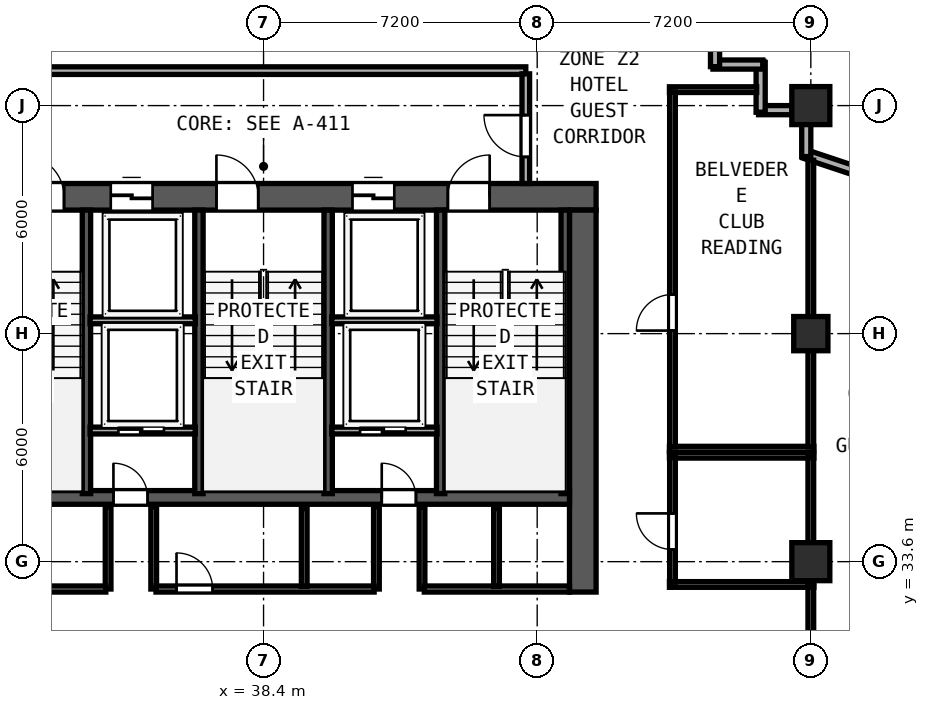
"""IFC4 building model, lengths in metres.
Left out: names, types, materials, properties, quantities, classifications, styles, units other than length and angle.
Written with IfcOpenShell. Run it as: python <this file> out.ifc"""

import sys

from ifc_helpers import new_model, si_unit, direction, frame, frame_2d, origin, origin_2d, place, context, subcontext, project, spatial, rectangle, hollow_rectangle, extrude, element, fill, save


model = new_model("IFC4")
c1 = context("Model", 3, precision=1e-05, world=origin(), true_north=direction((0.0, 1.0)))
c2 = subcontext(c1, "Body", "Model", "MODEL_VIEW")
j1 = project(units=[si_unit("LENGTHUNIT", "METRE"), si_unit("PLANEANGLEUNIT", "RADIAN")], contexts=[c1])
p1 = place(None, origin())
s1 = spatial("IfcSite", under=j1, at=p1, CompositionType="ELEMENT")
p2 = place(p1, origin())
s2 = spatial("IfcBuilding", under=s1, at=p2, CompositionType="ELEMENT")
p3 = place(p2, frame((0.0, 0.0, 128.8)))
s3 = spatial("IfcBuildingStorey", under=s2, at=p3, CompositionType="ELEMENT", Elevation=128.8)
p4 = place(p3, frame((29.65, 43.2, 0.0), z_axis=(0.0, 0.0, 1.0), x_axis=(1.0, 0.0, 0.0)))
e1 = element("IfcWall", 1, at=p4, inside=s3, PredefinedType="SHEAR", context=c2, shape_type="SweptSolid", body=[
    extrude(rectangle(XDim=17.5, YDim=0.7, at=frame_2d((8.75, 0.0))), origin(), (0.0, 0.0, 1.0), 3.6),
])
p5 = place(p4, frame((2.4, 0.0, 0.0)))
e2 = element("IfcOpeningElement", 2, at=p5, cuts=e1, PredefinedType="OPENING", context=c2, shape_type="SweptSolid", body=[
    extrude(rectangle(XDim=1.1, YDim=2.15, at=frame_2d((0.55, 1.075))), frame((0.0, 0.36, 0.0), z_axis=(0.0, -1.0, 0.0), x_axis=(1.0, 0.0, 0.0)), (0.0, 0.0, 1.0), 0.72),
])
p6 = place(p4, frame((7.51, 0.0, 0.0)))
e3 = element("IfcOpeningElement", 3, at=p6, cuts=e1, PredefinedType="OPENING", context=c2, shape_type="SweptSolid", body=[
    extrude(rectangle(XDim=1.1, YDim=2.15, at=frame_2d((0.55, 1.075))), frame((0.0, 0.36, 0.0), z_axis=(0.0, -1.0, 0.0), x_axis=(1.0, 0.0, 0.0)), (0.0, 0.0, 1.0), 0.72),
])
p7 = place(p4, frame((13.6, 0.0, 0.0)))
e4 = element("IfcOpeningElement", 4, at=p7, cuts=e1, PredefinedType="OPENING", context=c2, shape_type="SweptSolid", body=[
    extrude(rectangle(XDim=1.1, YDim=2.15, at=frame_2d((0.55, 1.075))), frame((0.0, 0.36, 0.0), z_axis=(0.0, -1.0, 0.0), x_axis=(1.0, 0.0, 0.0)), (0.0, 0.0, 1.0), 0.72),
])
p8 = place(p4, frame((4.73, 0.0, 0.0)))
e5 = element("IfcOpeningElement", 5, at=p8, cuts=e1, PredefinedType="OPENING", context=c2, shape_type="SweptSolid", body=[
    extrude(rectangle(XDim=1.1, YDim=2.2, at=frame_2d((0.55, 1.1))), frame((0.0, 0.36, 0.0), z_axis=(0.0, -1.0, 0.0), x_axis=(1.0, 0.0, 0.0)), (0.0, 0.0, 1.0), 0.72),
])
p9 = place(p4, frame((11.09, 0.0, 0.0)))
e6 = element("IfcOpeningElement", 6, at=p9, cuts=e1, PredefinedType="OPENING", context=c2, shape_type="SweptSolid", body=[
    extrude(rectangle(XDim=1.1, YDim=2.2, at=frame_2d((0.55, 1.1))), frame((0.0, 0.36, 0.0), z_axis=(0.0, -1.0, 0.0), x_axis=(1.0, 0.0, 0.0)), (0.0, 0.0, 1.0), 0.72),
])
p10 = place(p3, frame((46.8, 32.8, 0.0), z_axis=(0.0, 0.0, 1.0), x_axis=(0.0, 1.0, 0.0)))
e7 = element("IfcWall", 7, at=p10, inside=s3, PredefinedType="SHEAR", context=c2, shape_type="SweptSolid", body=[
    extrude(rectangle(XDim=10.05, YDim=0.7, at=frame_2d((5.025, 0.0))), origin(), (0.0, 0.0, 1.0), 3.6),
])
p11 = place(p3, frame((30.35, 35.29, 0.0), z_axis=(0.0, 0.0, 1.0), x_axis=(1.0, 0.0, 0.0)))
e8 = element("IfcWall", 8, at=p11, inside=s3, PredefinedType="SHEAR", context=c2, shape_type="SweptSolid", body=[
    extrude(rectangle(XDim=16.1, YDim=0.36, at=frame_2d((8.05, 0.0))), origin(), (0.0, 0.0, 1.0), 3.6),
])
p12 = place(p11, frame((5.0, 0.0, 0.0), z_axis=(0.0, 0.0, 1.0), x_axis=(-1.0, 0.0, 0.0)))
e9 = element("IfcOpeningElement", 9, at=p12, cuts=e8, PredefinedType="OPENING", context=c2, shape_type="SweptSolid", body=[
    extrude(rectangle(XDim=0.9, YDim=2.1, at=frame_2d((0.45, 1.05))), frame((0.0, 0.19, 0.0), z_axis=(0.0, -1.0, 0.0), x_axis=(1.0, 0.0, 0.0)), (0.0, 0.0, 1.0), 0.38),
])
p13 = place(p11, frame((12.06, 0.0, 0.0), z_axis=(0.0, 0.0, 1.0), x_axis=(-1.0, 0.0, 0.0)))
e10 = element("IfcOpeningElement", 10, at=p13, cuts=e8, PredefinedType="OPENING", context=c2, shape_type="SweptSolid", body=[
    extrude(rectangle(XDim=0.9, YDim=2.1, at=frame_2d((0.45, 1.05))), frame((0.0, 0.19, 0.0), z_axis=(0.0, -1.0, 0.0), x_axis=(1.0, 0.0, 0.0)), (0.0, 0.0, 1.0), 0.38),
])
for number, where, z_axis, x_axis in (
    (11, (33.74, 35.39, 0.0), (0.0, 0.0, 1.0), (0.0, 1.0, 0.0)),
    (12, (36.7, 35.39, 0.0), (0.0, 0.0, 1.0), (0.0, 1.0, 0.0)),
    (13, (40.1, 35.39, 0.0), (0.0, 0.0, 1.0), (0.0, 1.0, 0.0)),
    (14, (43.06, 35.39, 0.0), (0.0, 0.0, 1.0), (0.0, 1.0, 0.0)),
    (15, (46.338, 35.39, 0.0), (0.0, 0.0, 1.0), (0.0, 1.0, 0.0)),
):
    element("IfcWall", number, at=place(p3, frame(where, z_axis=z_axis, x_axis=x_axis)), inside=s3, PredefinedType="SHEAR", context=c2, shape_type="SweptSolid", body=[
        extrude(rectangle(XDim=7.46, YDim=0.22, at=frame_2d((3.73, 0.0))), origin(), (0.0, 0.0, 1.0), 3.6),
    ])
for number, where, z_axis, x_axis in (
    (16, (52.8, 33.6, 0.0), (0.0, 0.0, 1.0), (1.0, 0.0, 0.0)),
    (17, (52.8, 45.6, 0.0), (0.0, 0.0, 1.0), (1.0, 0.0, 0.0)),
):
    element("IfcColumn", number, at=place(p3, frame(where, z_axis=z_axis, x_axis=x_axis)), inside=s3, PredefinedType="COLUMN", context=c2, shape_type="SweptSolid", body=[
        extrude(hollow_rectangle(XDim=1.0, YDim=1.0, WallThickness=0.038, at=origin_2d()), origin(), (0.0, 0.0, 1.0), 3.8),
    ])
p14 = place(p3, frame((52.8, 39.6, 0.0), z_axis=(0.0, 0.0, 1.0), x_axis=(1.0, 0.0, 0.0)))
e18 = element("IfcColumn", 18, at=p14, inside=s3, PredefinedType="COLUMN", context=c2, shape_type="SweptSolid", body=[
    extrude(hollow_rectangle(XDim=0.9, YDim=0.9, WallThickness=0.034, at=origin_2d()), origin(), (0.0, 0.0, 1.0), 3.8),
])
p15 = place(p3, frame((58.295, 42.442, 0.0), z_axis=(0.0, 0.0, 1.0), x_axis=(-0.948687385027, 0.316215504823, 0.0)))
e19 = element("IfcWall", 19, at=p15, inside=s3, PredefinedType="SOLIDWALL", context=c2, shape_type="SweptSolid", body=[
    extrude(rectangle(XDim=5.973, YDim=0.24, at=frame_2d((2.987, 0.0))), origin(), (0.0, 0.0, 1.0), 3.145),
])
p16 = place(p15, frame((1.406, 0.0, 0.85)))
e20 = element("IfcOpeningElement", 20, at=p16, cuts=e19, PredefinedType="OPENING", context=c2, shape_type="SweptSolid", body=[
    extrude(rectangle(XDim=1.15, YDim=1.8, at=frame_2d((0.575, 0.9))), frame((0.0, 0.13, 0.0), z_axis=(0.0, -1.0, 0.0), x_axis=(1.0, 0.0, 0.0)), (0.0, 0.0, 1.0), 0.26),
])
p17 = place(p3, frame((52.68, 44.259, 0.0), z_axis=(0.0, 0.0, 1.0), x_axis=(0.0, 1.0, 0.0)))
e21 = element("IfcWall", 21, at=p17, inside=s3, PredefinedType="SOLIDWALL", context=c2, shape_type="SweptSolid", body=[
    extrude(rectangle(XDim=0.849, YDim=0.24, at=frame_2d((0.425, 0.0))), origin(), (0.0, 0.0, 1.0), 3.145),
])
p18 = place(p3, frame((52.308, 45.48, 0.0), z_axis=(0.0, 0.0, 1.0), x_axis=(-1.0, 0.0, 0.0)))
e22 = element("IfcWall", 22, at=p18, inside=s3, PredefinedType="SOLIDWALL", context=c2, shape_type="SweptSolid", body=[
    extrude(rectangle(XDim=0.883, YDim=0.24, at=frame_2d((0.441, 0.0))), origin(), (0.0, 0.0, 1.0), 3.6),
])
p19 = place(p3, frame((51.48, 45.425, 0.0), z_axis=(0.0, 0.0, 1.0), x_axis=(0.0, 1.0, 0.0)))
e23 = element("IfcWall", 23, at=p19, inside=s3, PredefinedType="SOLIDWALL", context=c2, shape_type="SweptSolid", body=[
    extrude(rectangle(XDim=1.31, YDim=0.24, at=frame_2d((0.655, 0.0))), origin(), (0.0, 0.0, 1.0), 3.6),
])
p20 = place(p3, frame((51.535, 46.68, 0.0), z_axis=(0.0, 0.0, 1.0), x_axis=(-1.0, 0.0, 0.0)))
e24 = element("IfcWall", 24, at=p20, inside=s3, PredefinedType="SOLIDWALL", context=c2, shape_type="SweptSolid", body=[
    extrude(rectangle(XDim=1.31, YDim=0.24, at=frame_2d((0.655, 0.0))), origin(), (0.0, 0.0, 1.0), 3.6),
])
p21 = place(p3, frame((50.28, 46.625, 0.0), z_axis=(0.0, 0.0, 1.0), x_axis=(0.0, 1.0, 0.0)))
e25 = element("IfcWall", 25, at=p21, inside=s3, PredefinedType="SOLIDWALL", context=c2, shape_type="SweptSolid", body=[
    extrude(rectangle(XDim=1.54, YDim=0.24, at=frame_2d((0.77, 0.0))), origin(), (0.0, 0.0, 1.0), 3.6),
])
p22 = place(p3, frame((31.5, 46.52, 0.0), z_axis=(0.0, 0.0, 1.0), x_axis=(1.0, 0.0, 0.0)))
e26 = element("IfcWall", 26, at=p22, inside=s3, PredefinedType="SOLIDWALL", context=c2, shape_type="SweptSolid", body=[
    extrude(rectangle(XDim=13.8, YDim=0.2, at=frame_2d((6.9, 0.0))), origin(), (0.0, 0.0, 1.0), 3.6),
])
p23 = place(p3, frame((45.3, 43.55, 0.0), z_axis=(0.0, 0.0, 1.0), x_axis=(0.0, 1.0, 0.0)))
e27 = element("IfcWall", 27, at=p23, inside=s3, PredefinedType="SOLIDWALL", context=c2, shape_type="SweptSolid", body=[
    extrude(rectangle(XDim=2.885, YDim=0.2, at=frame_2d((1.442, 0.0))), origin(), (0.0, 0.0, 1.0), 3.6),
])
p24 = place(p23, frame((0.7, 0.0, 0.0)))
e28 = element("IfcOpeningElement", 28, at=p24, cuts=e27, PredefinedType="OPENING", context=c2, shape_type="SweptSolid", body=[
    extrude(rectangle(XDim=1.1, YDim=2.15, at=frame_2d((0.55, 1.075))), frame((0.0, 0.11, 0.0), z_axis=(0.0, -1.0, 0.0), x_axis=(1.0, 0.0, 0.0)), (0.0, 0.0, 1.0), 0.22),
])
for number, where, z_axis, x_axis in (
    (29, (33.835, 39.95, 0.0), (0.0, 0.0, 1.0), (1.0, 0.0, 0.0)),
    (30, (40.195, 39.95, 0.0), (0.0, 0.0, 1.0), (1.0, 0.0, 0.0)),
):
    element("IfcWall", number, at=place(p3, frame(where, z_axis=z_axis, x_axis=x_axis)), inside=s3, PredefinedType="SOLIDWALL", context=c2, shape_type="SweptSolid", body=[
        extrude(rectangle(XDim=2.77, YDim=0.18, at=frame_2d((1.385, 0.0))), origin(), (0.0, 0.0, 1.0), 3.6),
    ])
p25 = place(p3, frame((33.835, 37.05, 0.0), z_axis=(0.0, 0.0, 1.0), x_axis=(1.0, 0.0, 0.0)))
e31 = element("IfcWall", 31, at=p25, inside=s3, PredefinedType="SOLIDWALL", context=c2, shape_type="SweptSolid", body=[
    extrude(rectangle(XDim=2.77, YDim=0.18, at=frame_2d((1.385, 0.0))), origin(), (0.0, 0.0, 1.0), 3.6),
])
p26 = place(p25, frame((1.945, 0.0, 0.0), z_axis=(0.0, 0.0, 1.0), x_axis=(-1.0, 0.0, 0.0)))
e32 = element("IfcOpeningElement", 32, at=p26, cuts=e31, PredefinedType="OPENING", context=c2, shape_type="SweptSolid", body=[
    extrude(rectangle(XDim=1.2, YDim=2.2, at=frame_2d((0.6, 1.1))), frame((0.0, 0.1, 0.0), z_axis=(0.0, -1.0, 0.0), x_axis=(1.0, 0.0, 0.0)), (0.0, 0.0, 1.0), 0.2),
])
for number, where, z_axis, x_axis in (
    (33, (34.31, 32.88, 0.0), (0.0, 0.0, 1.0), (0.0, 1.0, 0.0)),
    (34, (35.51, 32.88, 0.0), (0.0, 0.0, 1.0), (0.0, 1.0, 0.0)),
):
    element("IfcWall", number, at=place(p3, frame(where, z_axis=z_axis, x_axis=x_axis)), inside=s3, PredefinedType="SOLIDWALL", context=c2, shape_type="SweptSolid", body=[
        extrude(rectangle(XDim=2.17, YDim=0.15, at=frame_2d((1.085, 0.0))), origin(), (0.0, 0.0, 1.0), 3.6),
    ])
p27 = place(p3, frame((40.195, 37.05, 0.0), z_axis=(0.0, 0.0, 1.0), x_axis=(1.0, 0.0, 0.0)))
e35 = element("IfcWall", 35, at=p27, inside=s3, PredefinedType="SOLIDWALL", context=c2, shape_type="SweptSolid", body=[
    extrude(rectangle(XDim=2.77, YDim=0.18, at=frame_2d((1.385, 0.0))), origin(), (0.0, 0.0, 1.0), 3.6),
])
p28 = place(p27, frame((1.945, 0.0, 0.0), z_axis=(0.0, 0.0, 1.0), x_axis=(-1.0, 0.0, 0.0)))
e36 = element("IfcOpeningElement", 36, at=p28, cuts=e35, PredefinedType="OPENING", context=c2, shape_type="SweptSolid", body=[
    extrude(rectangle(XDim=1.2, YDim=2.2, at=frame_2d((0.6, 1.1))), frame((0.0, 0.1, 0.0), z_axis=(0.0, -1.0, 0.0), x_axis=(1.0, 0.0, 0.0)), (0.0, 0.0, 1.0), 0.2),
])
for number, where, z_axis, x_axis in (
    (37, (41.37, 32.88, 0.0), (0.0, 0.0, 1.0), (0.0, 1.0, 0.0)),
    (38, (42.57, 32.88, 0.0), (0.0, 0.0, 1.0), (0.0, 1.0, 0.0)),
):
    element("IfcWall", number, at=place(p3, frame(where, z_axis=z_axis, x_axis=x_axis)), inside=s3, PredefinedType="SOLIDWALL", context=c2, shape_type="SweptSolid", body=[
        extrude(rectangle(XDim=2.17, YDim=0.15, at=frame_2d((1.085, 0.0))), origin(), (0.0, 0.0, 1.0), 3.6),
    ])
p29 = place(p3, frame((30.35, 32.88, 0.0), z_axis=(0.0, 0.0, 1.0), x_axis=(1.0, 0.0, 0.0)))
e39 = element("IfcWall", 39, at=p29, inside=s3, PredefinedType="SOLIDWALL", context=c2, shape_type="SweptSolid", body=[
    extrude(rectangle(XDim=3.9, YDim=0.16, at=frame_2d((1.95, 0.0))), origin(), (0.0, 0.0, 1.0), 3.6),
])
p30 = place(p29, frame((2.2, 0.0, 0.0), z_axis=(0.0, 0.0, 1.0), x_axis=(-1.0, 0.0, 0.0)))
e40 = element("IfcOpeningElement", 40, at=p30, cuts=e39, PredefinedType="OPENING", context=c2, shape_type="SweptSolid", body=[
    extrude(rectangle(XDim=0.95, YDim=2.12, at=frame_2d((0.475, 1.06))), frame((0.0, 0.09, 0.0), z_axis=(0.0, -1.0, 0.0), x_axis=(1.0, 0.0, 0.0)), (0.0, 0.0, 1.0), 0.18),
])
p31 = place(p3, frame((35.57, 32.88, 0.0), z_axis=(0.0, 0.0, 1.0), x_axis=(1.0, 0.0, 0.0)))
e41 = element("IfcWall", 41, at=p31, inside=s3, PredefinedType="SOLIDWALL", context=c2, shape_type="SweptSolid", body=[
    extrude(rectangle(XDim=5.74, YDim=0.16, at=frame_2d((2.87, 0.0))), origin(), (0.0, 0.0, 1.0), 3.6),
])
p32 = place(p31, frame((1.49, 0.0, 0.0), z_axis=(0.0, 0.0, 1.0), x_axis=(-1.0, 0.0, 0.0)))
e42 = element("IfcOpeningElement", 42, at=p32, cuts=e41, PredefinedType="OPENING", context=c2, shape_type="SweptSolid", body=[
    extrude(rectangle(XDim=0.95, YDim=2.12, at=frame_2d((0.475, 1.06))), frame((0.0, 0.09, 0.0), z_axis=(0.0, -1.0, 0.0), x_axis=(1.0, 0.0, 0.0)), (0.0, 0.0, 1.0), 0.18),
])
p33 = place(p3, frame((42.63, 32.88, 0.0), z_axis=(0.0, 0.0, 1.0), x_axis=(1.0, 0.0, 0.0)))
e43 = element("IfcWall", 43, at=p33, inside=s3, PredefinedType="SOLIDWALL", context=c2, shape_type="SweptSolid", body=[
    extrude(rectangle(XDim=3.82, YDim=0.16, at=frame_2d((1.91, 0.0))), origin(), (0.0, 0.0, 1.0), 3.6),
])
for number, where, z_axis, x_axis in (
    (44, (39.47, 32.95, 0.0), (0.0, 0.0, 1.0), (0.0, 1.0, 0.0)),
    (45, (44.53, 32.95, 0.0), (0.0, 0.0, 1.0), (0.0, 1.0, 0.0)),
):
    element("IfcWall", number, at=place(p3, frame(where, z_axis=z_axis, x_axis=x_axis)), inside=s3, PredefinedType="SOLIDWALL", context=c2, shape_type="SweptSolid", body=[
        extrude(rectangle(XDim=2.05, YDim=0.15, at=frame_2d((1.025, 0.0))), origin(), (0.0, 0.0, 1.0), 3.6),
    ])
for number, where, z_axis, x_axis in (
    (46, (49.08, 36.4, 0.0), (0.0, 0.0, 1.0), (1.0, 0.0, 0.0)),
    (47, (49.08, 33.0, 0.0), (0.0, 0.0, 1.0), (1.0, 0.0, 0.0)),
):
    element("IfcWall", number, at=place(p3, frame(where, z_axis=z_axis, x_axis=x_axis)), inside=s3, PredefinedType="PARTITIONING", context=c2, shape_type="SweptSolid", body=[
        extrude(rectangle(XDim=3.8, YDim=0.15, at=frame_2d((1.9, 0.0))), origin(), (0.0, 0.0, 1.0), 3.6),
    ])
p34 = place(p3, frame((49.16, 33.06, 0.0), z_axis=(0.0, 0.0, 1.0), x_axis=(0.0, 1.0, 0.0)))
e48 = element("IfcWall", 48, at=p34, inside=s3, PredefinedType="PARTITIONING", context=c2, shape_type="SweptSolid", body=[
    extrude(rectangle(XDim=3.28, YDim=0.15, at=frame_2d((1.64, 0.0))), origin(), (0.0, 0.0, 1.0), 3.6),
])
p35 = place(p34, frame((0.86, 0.0, 0.0)))
e49 = element("IfcOpeningElement", 49, at=p35, cuts=e48, PredefinedType="OPENING", context=c2, shape_type="SweptSolid", body=[
    extrude(rectangle(XDim=0.95, YDim=2.12, at=frame_2d((0.475, 1.06))), frame((0.0, 0.085, 0.0), z_axis=(0.0, -1.0, 0.0), x_axis=(1.0, 0.0, 0.0)), (0.0, 0.0, 1.0), 0.17),
])
p36 = place(p3, frame((52.8, 33.06, 0.0), z_axis=(0.0, 0.0, 1.0), x_axis=(0.0, 1.0, 0.0)))
e50 = element("IfcWall", 50, at=p36, inside=s3, PredefinedType="PARTITIONING", context=c2, shape_type="SweptSolid", body=[
    extrude(rectangle(XDim=3.28, YDim=0.15, at=frame_2d((1.64, 0.0))), origin(), (0.0, 0.0, 1.0), 3.145),
])
p37 = place(p3, frame((49.08, 46.02, 0.0), z_axis=(0.0, 0.0, 1.0), x_axis=(1.0, 0.0, 0.0)))
e51 = element("IfcWall", 51, at=p37, inside=s3, PredefinedType="PARTITIONING", context=c2, shape_type="SweptSolid", body=[
    extrude(rectangle(XDim=2.295, YDim=0.15, at=frame_2d((1.147, 0.0))), origin(), (0.0, 0.0, 1.0), 3.6),
])
p38 = place(p3, frame((49.08, 36.56, 0.0), z_axis=(0.0, 0.0, 1.0), x_axis=(1.0, 0.0, 0.0)))
e52 = element("IfcWall", 52, at=p38, inside=s3, PredefinedType="PARTITIONING", context=c2, shape_type="SweptSolid", body=[
    extrude(rectangle(XDim=3.8, YDim=0.15, at=frame_2d((1.9, 0.0))), origin(), (0.0, 0.0, 1.0), 3.6),
])
p39 = place(p3, frame((49.16, 36.62, 0.0), z_axis=(0.0, 0.0, 1.0), x_axis=(0.0, 1.0, 0.0)))
e53 = element("IfcWall", 53, at=p39, inside=s3, PredefinedType="PARTITIONING", context=c2, shape_type="SweptSolid", body=[
    extrude(rectangle(XDim=9.34, YDim=0.15, at=frame_2d((4.67, 0.0))), origin(), (0.0, 0.0, 1.0), 3.6),
])
p40 = place(p39, frame((3.06, 0.0, 0.0)))
e54 = element("IfcOpeningElement", 54, at=p40, cuts=e53, PredefinedType="OPENING", context=c2, shape_type="SweptSolid", body=[
    extrude(rectangle(XDim=0.95, YDim=2.12, at=frame_2d((0.475, 1.06))), frame((0.0, 0.085, 0.0), z_axis=(0.0, -1.0, 0.0), x_axis=(1.0, 0.0, 0.0)), (0.0, 0.0, 1.0), 0.17),
])
p41 = place(p3, frame((52.8, 36.62, 0.0), z_axis=(0.0, 0.0, 1.0), x_axis=(0.0, 1.0, 0.0)))
e55 = element("IfcWall", 55, at=p41, inside=s3, PredefinedType="PARTITIONING", context=c2, shape_type="SweptSolid", body=[
    extrude(rectangle(XDim=7.543, YDim=0.15, at=frame_2d((3.771, 0.0))), origin(), (0.0, 0.0, 1.0), 3.145),
])
p42 = place(p3, frame((52.8, 30.44, 0.0), z_axis=(0.0, 0.0, 1.0), x_axis=(0.0, 1.0, 0.0)))
e56 = element("IfcWall", 56, at=p42, inside=s3, PredefinedType="PARTITIONING", context=c2, shape_type="SweptSolid", body=[
    extrude(rectangle(XDim=2.5, YDim=0.15, at=frame_2d((1.25, 0.0))), origin(), (0.0, 0.0, 1.0), 3.145),
])
p43 = place(p5, origin())
e57 = element("IfcDoor", 57, at=p43, inside=s3, OperationType="SINGLE_SWING_LEFT", PredefinedType="DOOR", context=c2, shape_type="SweptSolid", body=[
    extrude(rectangle(XDim=1.1, YDim=2.15, at=frame_2d((0.55, 1.075))), frame((0.0, 0.185, 0.0), z_axis=(0.0, -1.0, 0.0), x_axis=(1.0, 0.0, 0.0)), (0.0, 0.0, 1.0), 0.05),
])
fill(e2, e57)
p44 = place(p6, origin())
e58 = element("IfcDoor", 58, at=p44, inside=s3, OperationType="SINGLE_SWING_LEFT", PredefinedType="DOOR", context=c2, shape_type="SweptSolid", body=[
    extrude(rectangle(XDim=1.1, YDim=2.15, at=frame_2d((0.55, 1.075))), frame((0.0, 0.185, 0.0), z_axis=(0.0, -1.0, 0.0), x_axis=(1.0, 0.0, 0.0)), (0.0, 0.0, 1.0), 0.05),
])
fill(e3, e58)
p45 = place(p7, origin())
e59 = element("IfcDoor", 59, at=p45, inside=s3, OperationType="SINGLE_SWING_RIGHT", PredefinedType="DOOR", context=c2, shape_type="SweptSolid", body=[
    extrude(rectangle(XDim=1.1, YDim=2.15, at=frame_2d((0.55, 1.075))), frame((0.0, 0.185, 0.0), z_axis=(0.0, -1.0, 0.0), x_axis=(1.0, 0.0, 0.0)), (0.0, 0.0, 1.0), 0.05),
])
fill(e4, e59)
p46 = place(p24, origin())
e60 = element("IfcDoor", 60, at=p46, inside=s3, OperationType="SINGLE_SWING_RIGHT", PredefinedType="DOOR", context=c2, shape_type="SweptSolid", body=[
    extrude(rectangle(XDim=1.1, YDim=2.15, at=frame_2d((0.55, 1.075))), frame((0.0, 0.025, 0.0), z_axis=(0.0, -1.0, 0.0), x_axis=(1.0, 0.0, 0.0)), (0.0, 0.0, 1.0), 0.05),
])
fill(e28, e60)
p47 = place(p8, origin())
e61 = element("IfcDoor", 61, at=p47, inside=s3, OperationType="SLIDING_TO_LEFT", PredefinedType="DOOR", context=c2, shape_type="SweptSolid", body=[
    extrude(rectangle(XDim=1.1, YDim=2.2, at=frame_2d((0.55, 1.1))), frame((0.0, 0.185, 0.0), z_axis=(0.0, -1.0, 0.0), x_axis=(1.0, 0.0, 0.0)), (0.0, 0.0, 1.0), 0.05),
])
fill(e5, e61)
p48 = place(p9, origin())
e62 = element("IfcDoor", 62, at=p48, inside=s3, OperationType="SLIDING_TO_LEFT", PredefinedType="DOOR", context=c2, shape_type="SweptSolid", body=[
    extrude(rectangle(XDim=1.1, YDim=2.2, at=frame_2d((0.55, 1.1))), frame((0.0, 0.185, 0.0), z_axis=(0.0, -1.0, 0.0), x_axis=(1.0, 0.0, 0.0)), (0.0, 0.0, 1.0), 0.05),
])
fill(e6, e62)
p49 = place(p26, origin())
e63 = element("IfcDoor", 63, at=p49, inside=s3, OperationType="SLIDING_TO_RIGHT", PredefinedType="DOOR", context=c2, shape_type="SweptSolid", body=[
    extrude(rectangle(XDim=1.2, YDim=2.2, at=frame_2d((0.6, 1.1))), frame((0.0, 0.025, 0.0), z_axis=(0.0, -1.0, 0.0), x_axis=(1.0, 0.0, 0.0)), (0.0, 0.0, 1.0), 0.05),
])
fill(e32, e63)
p50 = place(p12, origin())
e64 = element("IfcDoor", 64, at=p50, inside=s3, OperationType="SINGLE_SWING_RIGHT", PredefinedType="DOOR", context=c2, shape_type="SweptSolid", body=[
    extrude(rectangle(XDim=0.9, YDim=2.1, at=frame_2d((0.45, 1.05))), frame((0.0, 0.025, 0.0), z_axis=(0.0, -1.0, 0.0), x_axis=(1.0, 0.0, 0.0)), (0.0, 0.0, 1.0), 0.05),
])
fill(e9, e64)
p51 = place(p28, origin())
e65 = element("IfcDoor", 65, at=p51, inside=s3, OperationType="SLIDING_TO_RIGHT", PredefinedType="DOOR", context=c2, shape_type="SweptSolid", body=[
    extrude(rectangle(XDim=1.2, YDim=2.2, at=frame_2d((0.6, 1.1))), frame((0.0, 0.025, 0.0), z_axis=(0.0, -1.0, 0.0), x_axis=(1.0, 0.0, 0.0)), (0.0, 0.0, 1.0), 0.05),
])
fill(e36, e65)
p52 = place(p13, origin())
e66 = element("IfcDoor", 66, at=p52, inside=s3, OperationType="SINGLE_SWING_RIGHT", PredefinedType="DOOR", context=c2, shape_type="SweptSolid", body=[
    extrude(rectangle(XDim=0.9, YDim=2.1, at=frame_2d((0.45, 1.05))), frame((0.0, 0.025, 0.0), z_axis=(0.0, -1.0, 0.0), x_axis=(1.0, 0.0, 0.0)), (0.0, 0.0, 1.0), 0.05),
])
fill(e10, e66)
p53 = place(p32, origin())
e67 = element("IfcDoor", 67, at=p53, inside=s3, OperationType="SINGLE_SWING_RIGHT", PredefinedType="DOOR", context=c2, shape_type="SweptSolid", body=[
    extrude(rectangle(XDim=0.95, YDim=2.12, at=frame_2d((0.475, 1.06))), frame((0.0, 0.025, 0.0), z_axis=(0.0, -1.0, 0.0), x_axis=(1.0, 0.0, 0.0)), (0.0, 0.0, 1.0), 0.05),
])
fill(e42, e67)
p54 = place(p35, origin())
e68 = element("IfcDoor", 68, at=p54, inside=s3, OperationType="SINGLE_SWING_RIGHT", PredefinedType="DOOR", context=c2, shape_type="SweptSolid", body=[
    extrude(rectangle(XDim=0.95, YDim=2.12, at=frame_2d((0.475, 1.06))), frame((0.0, 0.025, 0.0), z_axis=(0.0, -1.0, 0.0), x_axis=(1.0, 0.0, 0.0)), (0.0, 0.0, 1.0), 0.05),
])
fill(e49, e68)
p55 = place(p40, origin())
e69 = element("IfcDoor", 69, at=p55, inside=s3, OperationType="SINGLE_SWING_LEFT", PredefinedType="DOOR", context=c2, shape_type="SweptSolid", body=[
    extrude(rectangle(XDim=0.95, YDim=2.12, at=frame_2d((0.475, 1.06))), frame((0.0, 0.025, 0.0), z_axis=(0.0, -1.0, 0.0), x_axis=(1.0, 0.0, 0.0)), (0.0, 0.0, 1.0), 0.05),
])
fill(e54, e69)
save(model, sys.argv[1])
